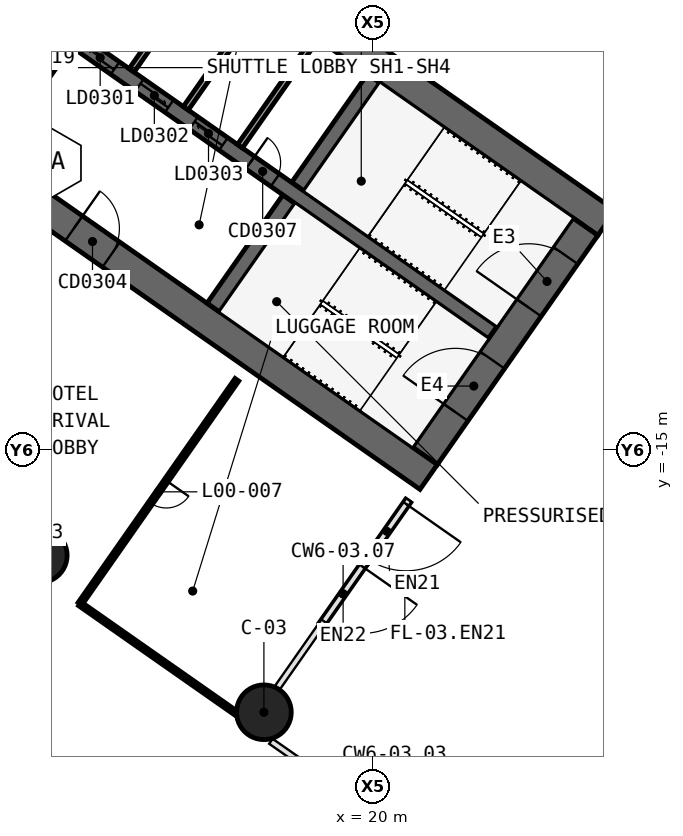
"""IFC4 building model, lengths in metres.
Left out: names, types, materials, properties, quantities, classifications, styles, units other than length and angle.
Written with IfcOpenShell. Run it as: python <this file> out.ifc"""

import sys

from ifc_helpers import new_model, si_unit, direction, frame, frame_2d, origin, origin_2d, place, context, subcontext, project, spatial, polyline, rectangle, circle, outline, extrude, element, fill, save


model = new_model("IFC4")
c1 = context("Model", 3, precision=1e-05, world=origin(), true_north=direction((0.0, 1.0)))
c2 = subcontext(c1, "Body", "Model", "MODEL_VIEW")
j1 = project(units=[si_unit("LENGTHUNIT", "METRE"), si_unit("PLANEANGLEUNIT", "RADIAN")], contexts=[c1])
p1 = place(None, origin())
s1 = spatial("IfcSite", under=j1, at=p1, CompositionType="ELEMENT")
p2 = place(p1, origin())
s2 = spatial("IfcBuilding", under=s1, at=p2, CompositionType="ELEMENT")
p3 = place(p2, origin())
s3 = spatial("IfcBuildingStorey", under=s2, at=p3, CompositionType="ELEMENT", Elevation=0.0)
p4 = place(p3, frame((-0.037, 11.867, 0.0), z_axis=(0.0, 0.0, 1.0), x_axis=(0.819155306259, -0.573571777746, 0.0)))
e1 = element("IfcWall", 1, at=p4, inside=s3, PredefinedType="SHEAR", context=c2, shape_type="SweptSolid", body=[
    extrude(outline(polyline([(33.837, 0.5), (0.0, 0.5), (0.7, -0.5), (33.837, -0.5), (33.837, 0.5)])), origin(), (0.0, 0.0, 1.0), 9.0),
])
p5 = place(p4, frame((4.287, 0.0, 0.0)))
e2 = element("IfcOpeningElement", 2, at=p5, cuts=e1, PredefinedType="OPENING", context=c2, shape_type="SweptSolid", body=[
    extrude(rectangle(XDim=1.1, YDim=2.1, at=frame_2d((0.55, 1.05))), frame((0.0, 0.51, 0.0), z_axis=(0.0, -1.0, 0.0), x_axis=(1.0, 0.0, 0.0)), (0.0, 0.0, 1.0), 1.02),
])
p6 = place(p3, frame((-0.037, -0.585, 0.0), z_axis=(0.0, 0.0, 1.0), x_axis=(0.819157152511, -0.573569140985, 0.0)))
e3 = element("IfcWall", 3, at=p6, inside=s3, PredefinedType="SHEAR", context=c2, shape_type="SweptSolid", body=[
    extrude(outline(polyline([(26.695, 0.5), (0.0, 0.5), (0.7, -0.5), (26.695, -0.5), (26.695, 0.5)])), origin(), (0.0, 0.0, 1.0), 9.0),
])
p7 = place(p6, frame((2.995, 0.0, 0.0)))
e4 = element("IfcOpeningElement", 4, at=p7, cuts=e3, PredefinedType="OPENING", context=c2, shape_type="SweptSolid", body=[
    extrude(rectangle(XDim=2.4, YDim=2.1, at=frame_2d((1.2, 1.05))), frame((0.0, 0.51, 0.0), z_axis=(0.0, -1.0, 0.0), x_axis=(1.0, 0.0, 0.0)), (0.0, 0.0, 1.0), 1.02),
])
p8 = place(p6, frame((12.445, 0.0, 0.0)))
e5 = element("IfcOpeningElement", 5, at=p8, cuts=e3, PredefinedType="OPENING", context=c2, shape_type="SweptSolid", body=[
    extrude(rectangle(XDim=1.5, YDim=2.1, at=frame_2d((0.75, 1.05))), frame((0.0, 0.51, 0.0), z_axis=(0.0, -1.0, 0.0), x_axis=(1.0, 0.0, 0.0)), (0.0, 0.0, 1.0), 1.02),
])
p9 = place(p3, frame((21.708, -15.2, 0.0), z_axis=(0.0, 0.0, 1.0), x_axis=(0.573576324356, 0.819152122709, 0.0)))
e6 = element("IfcWall", 6, at=p9, inside=s3, PredefinedType="SHEAR", context=c2, shape_type="SweptSolid", body=[
    extrude(outline(polyline([(9.2, 0.5), (0.0, 0.5), (0.0, -0.5), (9.2, -0.5), (9.2, 0.5)])), origin(), (0.0, 0.0, 1.0), 9.0),
])
p10 = place(p9, frame((5.95, 0.0, 0.0)))
e7 = element("IfcOpeningElement", 7, at=p10, cuts=e6, PredefinedType="OPENING", context=c2, shape_type="SweptSolid", body=[
    extrude(rectangle(XDim=2.1, YDim=2.1, at=frame_2d((1.05, 1.05))), frame((0.0, 0.51, 0.0), z_axis=(0.0, -1.0, 0.0), x_axis=(1.0, 0.0, 0.0)), (0.0, 0.0, 1.0), 1.02),
])
p11 = place(p9, frame((1.75, 0.0, 0.0)))
e8 = element("IfcOpeningElement", 8, at=p11, cuts=e6, PredefinedType="OPENING", context=c2, shape_type="SweptSolid", body=[
    extrude(rectangle(XDim=2.1, YDim=2.1, at=frame_2d((1.05, 1.05))), frame((0.0, 0.51, 0.0), z_axis=(0.0, -1.0, 0.0), x_axis=(1.0, 0.0, 0.0)), (0.0, 0.0, 1.0), 1.02),
])
p12 = place(p3, frame((7.372, -5.162, 0.0), z_axis=(0.0, 0.0, 1.0), x_axis=(0.573594173421, 0.819139624372, 0.0)))
e9 = element("IfcWall", 9, at=p12, inside=s3, PredefinedType="SHEAR", context=c2, shape_type="SweptSolid", body=[
    extrude(outline(polyline([(0.0, 0.25), (0.0, -0.25), (4.35, -0.25), (4.35, 0.25), (0.0, 0.25)])), origin(), (0.0, 0.0, 1.0), 9.0),
])
p13 = place(p3, frame((14.745, -10.324, 0.0), z_axis=(0.0, 0.0, 1.0), x_axis=(0.57356780395, 0.819158088694, 0.0)))
e10 = element("IfcWall", 10, at=p13, inside=s3, PredefinedType="SHEAR", context=c2, shape_type="SweptSolid", body=[
    extrude(outline(polyline([(0.0, 0.25), (0.0, -0.25), (4.35, -0.25), (4.35, 0.25), (0.0, 0.25)])), origin(), (0.0, 0.0, 1.0), 9.0),
])
p14 = place(p3, frame((17.527, -6.352, 0.0), z_axis=(0.0, 0.0, 1.0), x_axis=(0.573530143085, 0.819184457233, 0.0)))
e11 = element("IfcWall", 11, at=p14, inside=s3, PredefinedType="SHEAR", context=c2, shape_type="SweptSolid", body=[
    extrude(outline(polyline([(4.35, -0.25), (4.35, 0.25), (0.0, 0.25), (0.0, -0.25), (4.35, -0.25)])), origin(), (0.0, 0.0, 1.0), 9.0),
])
p15 = place(p3, frame((2.638, 3.768, 0.0), z_axis=(0.0, 0.0, 1.0), x_axis=(0.819148977158, -0.573580816643, 0.0)))
e12 = element("IfcWall", 12, at=p15, inside=s3, PredefinedType="SHEAR", context=c2, shape_type="SweptSolid", body=[
    extrude(outline(polyline([(0.0, 0.25), (0.0, -0.25), (26.0, -0.25), (26.0, 0.25), (0.0, 0.25)])), origin(), (0.0, 0.0, 1.0), 9.0),
])
p16 = place(p15, frame((1.119, 0.0, 0.0)))
e13 = element("IfcOpeningElement", 13, at=p16, cuts=e12, PredefinedType="OPENING", context=c2, shape_type="SweptSolid", body=[
    extrude(rectangle(XDim=1.2, YDim=2.1, at=frame_2d((0.6, 1.05))), frame((0.0, 0.26, 0.0), z_axis=(0.0, -1.0, 0.0), x_axis=(1.0, 0.0, 0.0)), (0.0, 0.0, 1.0), 0.52),
])
p17 = place(p15, frame((3.156, 0.0, 0.0)))
e14 = element("IfcOpeningElement", 14, at=p17, cuts=e12, PredefinedType="OPENING", context=c2, shape_type="SweptSolid", body=[
    extrude(rectangle(XDim=1.2, YDim=2.1, at=frame_2d((0.6, 1.05))), frame((0.0, 0.26, 0.0), z_axis=(0.0, -1.0, 0.0), x_axis=(1.0, 0.0, 0.0)), (0.0, 0.0, 1.0), 0.52),
])
p18 = place(p15, frame((5.194, 0.0, 0.0)))
e15 = element("IfcOpeningElement", 15, at=p18, cuts=e12, PredefinedType="OPENING", context=c2, shape_type="SweptSolid", body=[
    extrude(rectangle(XDim=1.2, YDim=2.1, at=frame_2d((0.6, 1.05))), frame((0.0, 0.26, 0.0), z_axis=(0.0, -1.0, 0.0), x_axis=(1.0, 0.0, 0.0)), (0.0, 0.0, 1.0), 0.52),
])
p19 = place(p15, frame((7.231, 0.0, 0.0)))
e16 = element("IfcOpeningElement", 16, at=p19, cuts=e12, PredefinedType="OPENING", context=c2, shape_type="SweptSolid", body=[
    extrude(rectangle(XDim=1.2, YDim=2.1, at=frame_2d((0.6, 1.05))), frame((0.0, 0.26, 0.0), z_axis=(0.0, -1.0, 0.0), x_axis=(1.0, 0.0, 0.0)), (0.0, 0.0, 1.0), 0.52),
])
p20 = place(p15, frame((9.637, 0.0, 0.0)))
e17 = element("IfcOpeningElement", 17, at=p20, cuts=e12, PredefinedType="OPENING", context=c2, shape_type="SweptSolid", body=[
    extrude(rectangle(XDim=1.2, YDim=2.1, at=frame_2d((0.6, 1.05))), frame((0.0, 0.26, 0.0), z_axis=(0.0, -1.0, 0.0), x_axis=(1.0, 0.0, 0.0)), (0.0, 0.0, 1.0), 0.52),
])
p21 = place(p15, frame((11.812, 0.0, 0.0)))
e18 = element("IfcOpeningElement", 18, at=p21, cuts=e12, PredefinedType="OPENING", context=c2, shape_type="SweptSolid", body=[
    extrude(rectangle(XDim=1.2, YDim=2.1, at=frame_2d((0.6, 1.05))), frame((0.0, 0.26, 0.0), z_axis=(0.0, -1.0, 0.0), x_axis=(1.0, 0.0, 0.0)), (0.0, 0.0, 1.0), 0.52),
])
p22 = place(p15, frame((13.988, 0.0, 0.0)))
e19 = element("IfcOpeningElement", 19, at=p22, cuts=e12, PredefinedType="OPENING", context=c2, shape_type="SweptSolid", body=[
    extrude(rectangle(XDim=1.2, YDim=2.1, at=frame_2d((0.6, 1.05))), frame((0.0, 0.26, 0.0), z_axis=(0.0, -1.0, 0.0), x_axis=(1.0, 0.0, 0.0)), (0.0, 0.0, 1.0), 0.52),
])
p23 = place(p15, frame((16.262, 0.0, 0.0)))
e20 = element("IfcOpeningElement", 20, at=p23, cuts=e12, PredefinedType="OPENING", context=c2, shape_type="SweptSolid", body=[
    extrude(rectangle(XDim=1.0, YDim=2.1, at=frame_2d((0.5, 1.05))), frame((0.0, 0.26, 0.0), z_axis=(0.0, -1.0, 0.0), x_axis=(1.0, 0.0, 0.0)), (0.0, 0.0, 1.0), 0.52),
])
for number, where, z_axis, x_axis in (
    (21, (9.038, -18.475, 0.0), (0.0, 0.0, 1.0), (0.819, -0.574, 0.0)),
    (22, (16.41, -23.637, 0.0), (0.0, 0.0, 1.0), (0.819, -0.574, 0.0)),
):
    element("IfcColumn", number, at=place(p3, frame(where, z_axis=z_axis, x_axis=x_axis)), inside=s3, PredefinedType="COLUMN", context=c2, shape_type="SweptSolid", body=[
        extrude(circle(Radius=0.9, at=origin_2d()), origin(), (0.0, 0.0, 1.0), 9.0),
    ])
p24 = place(p3, frame((12.059, -2.523, 0.0), z_axis=(0.0, 0.0, 1.0), x_axis=(0.573594173421, 0.819139624372, 0.0)))
e23 = element("IfcWall", 23, at=p24, inside=s3, PredefinedType="SOLIDWALL", context=c2, shape_type="SweptSolid", body=[
    extrude(rectangle(XDim=4.35, YDim=0.2, at=frame_2d((2.175, 0.0))), origin(), (0.0, 0.0, 1.0), 9.0),
])
p25 = place(p3, frame((13.84, -3.771, 0.0), z_axis=(0.0, 0.0, 1.0), x_axis=(0.57356780395, 0.819158088694, 0.0)))
e24 = element("IfcWall", 24, at=p25, inside=s3, PredefinedType="SOLIDWALL", context=c2, shape_type="SweptSolid", body=[
    extrude(rectangle(XDim=4.35, YDim=0.2, at=frame_2d((2.175, 0.0))), origin(), (0.0, 0.0, 1.0), 9.0),
])
p26 = place(p3, frame((15.622, -5.018, 0.0), z_axis=(0.0, 0.0, 1.0), x_axis=(0.573594173421, 0.819139624372, 0.0)))
e25 = element("IfcWall", 25, at=p26, inside=s3, PredefinedType="SOLIDWALL", context=c2, shape_type="SweptSolid", body=[
    extrude(rectangle(XDim=4.35, YDim=0.2, at=frame_2d((2.175, 0.0))), origin(), (0.0, 0.0, 1.0), 9.0),
])
p27 = place(p3, frame((21.158, -16.683, 0.0), z_axis=(0.0, 0.0, 1.0), x_axis=(-0.573616137927, -0.819124243512, 0.0)))
e26 = element("IfcWall", 26, at=p27, inside=s3, PredefinedType="SOLIDWALL", context=c2, shape_type="SweptSolid", body=[
    extrude(rectangle(XDim=2.45, YDim=0.2, at=frame_2d((1.225, 0.0))), origin(), (0.0, 0.0, 1.0), 2.7),
])
p28 = place(p27, frame((0.125, 0.0, 0.0)))
e27 = element("IfcOpeningElement", 27, at=p28, cuts=e26, PredefinedType="OPENING", context=c2, shape_type="SweptSolid", body=[
    extrude(rectangle(XDim=2.2, YDim=2.4, at=frame_2d((1.1, 1.2))), frame((0.0, 0.11, 0.0), z_axis=(0.0, -1.0, 0.0), x_axis=(1.0, 0.0, 0.0)), (0.0, 0.0, 1.0), 0.22),
])
p29 = place(p3, frame((19.718, -18.739, 0.0), z_axis=(0.0, 0.0, 1.0), x_axis=(-0.573549278612, -0.819171059672, 0.0)))
e28 = element("IfcWall", 28, at=p29, inside=s3, PredefinedType="SOLIDWALL", context=c2, shape_type="SweptSolid", body=[
    extrude(rectangle(XDim=2.45, YDim=0.2, at=frame_2d((1.225, 0.0))), origin(), (0.0, 0.0, 1.0), 2.7),
])
p30 = place(p29, frame((0.125, 0.0, 0.0)))
e29 = element("IfcOpeningElement", 29, at=p30, cuts=e28, PredefinedType="OPENING", context=c2, shape_type="SweptSolid", body=[
    extrude(rectangle(XDim=2.2, YDim=2.4, at=frame_2d((1.1, 1.2))), frame((0.0, 0.11, 0.0), z_axis=(0.0, -1.0, 0.0), x_axis=(1.0, 0.0, 0.0)), (0.0, 0.0, 1.0), 0.22),
])
p31 = place(p3, frame((10.359, -20.072, 0.0), z_axis=(0.0, 0.0, 1.0), x_axis=(0.819155033433, -0.573572167388, 0.0)))
e30 = element("IfcWall", 30, at=p31, inside=s3, PredefinedType="PARTITIONING", context=c2, shape_type="SweptSolid", body=[
    extrude(rectangle(XDim=6.266, YDim=0.15, at=frame_2d((3.133, 0.0))), origin(), (0.0, 0.0, 1.0), 8.6),
])
p32 = place(p3, frame((15.522, -12.7, 0.0), z_axis=(0.0, 0.0, 1.0), x_axis=(-0.573591598124, -0.819141427692, 0.0)))
e31 = element("IfcWall", 31, at=p32, inside=s3, PredefinedType="PARTITIONING", context=c2, shape_type="SweptSolid", body=[
    extrude(rectangle(XDim=9.0, YDim=0.15, at=frame_2d((4.5, 0.0))), origin(), (0.0, 0.0, 1.0), 7.38),
])
p33 = place(p32, frame((4.05, 0.0, 0.0)))
e32 = element("IfcOpeningElement", 32, at=p33, cuts=e31, PredefinedType="OPENING", context=c2, shape_type="SweptSolid", body=[
    extrude(rectangle(XDim=0.9, YDim=2.1, at=frame_2d((0.45, 1.05))), frame((0.0, 0.085, 0.0), z_axis=(0.0, -1.0, 0.0), x_axis=(1.0, 0.0, 0.0)), (0.0, 0.0, 1.0), 0.17),
])
p34 = place(p20, origin())
e33 = element("IfcDoor", 33, at=p34, inside=s3, OperationType="SLIDING_TO_LEFT", PredefinedType="DOOR", context=c2, shape_type="SweptSolid", body=[
    extrude(rectangle(XDim=1.2, YDim=2.1, at=frame_2d((0.6, 1.05))), frame((0.0, 0.025, 0.0), z_axis=(0.0, -1.0, 0.0), x_axis=(1.0, 0.0, 0.0)), (0.0, 0.0, 1.0), 0.05),
])
fill(e17, e33)
p35 = place(p21, origin())
e34 = element("IfcDoor", 34, at=p35, inside=s3, OperationType="SLIDING_TO_RIGHT", PredefinedType="DOOR", context=c2, shape_type="SweptSolid", body=[
    extrude(rectangle(XDim=1.2, YDim=2.1, at=frame_2d((0.6, 1.05))), frame((0.0, 0.025, 0.0), z_axis=(0.0, -1.0, 0.0), x_axis=(1.0, 0.0, 0.0)), (0.0, 0.0, 1.0), 0.05),
])
fill(e18, e34)
p36 = place(p22, origin())
e35 = element("IfcDoor", 35, at=p36, inside=s3, OperationType="SLIDING_TO_LEFT", PredefinedType="DOOR", context=c2, shape_type="SweptSolid", body=[
    extrude(rectangle(XDim=1.2, YDim=2.1, at=frame_2d((0.6, 1.05))), frame((0.0, 0.025, 0.0), z_axis=(0.0, -1.0, 0.0), x_axis=(1.0, 0.0, 0.0)), (0.0, 0.0, 1.0), 0.05),
])
fill(e19, e35)
p37 = place(p23, origin())
e36 = element("IfcDoor", 36, at=p37, inside=s3, OperationType="SINGLE_SWING_RIGHT", PredefinedType="DOOR", context=c2, shape_type="SweptSolid", body=[
    extrude(rectangle(XDim=1.0, YDim=2.1, at=frame_2d((0.5, 1.05))), frame((0.0, 0.025, 0.0), z_axis=(0.0, -1.0, 0.0), x_axis=(1.0, 0.0, 0.0)), (0.0, 0.0, 1.0), 0.05),
])
fill(e20, e36)
p38 = place(p8, origin())
e37 = element("IfcDoor", 37, at=p38, inside=s3, OperationType="DOUBLE_DOOR_SINGLE_SWING", PredefinedType="DOOR", context=c2, shape_type="SweptSolid", body=[
    extrude(rectangle(XDim=1.5, YDim=2.1, at=frame_2d((0.75, 1.05))), frame((0.0, 0.025, 0.0), z_axis=(0.0, -1.0, 0.0), x_axis=(1.0, 0.0, 0.0)), (0.0, 0.0, 1.0), 0.05),
])
fill(e5, e37)
p39 = place(p10, origin())
e38 = element("IfcDoor", 38, at=p39, inside=s3, OperationType="DOUBLE_DOOR_SINGLE_SWING", PredefinedType="DOOR", context=c2, shape_type="SweptSolid", body=[
    extrude(rectangle(XDim=2.1, YDim=2.1, at=frame_2d((1.05, 1.05))), frame((0.0, 0.025, 0.0), z_axis=(0.0, -1.0, 0.0), x_axis=(1.0, 0.0, 0.0)), (0.0, 0.0, 1.0), 0.05),
])
fill(e7, e38)
p40 = place(p11, origin())
e39 = element("IfcDoor", 39, at=p40, inside=s3, OperationType="DOUBLE_DOOR_SINGLE_SWING", PredefinedType="DOOR", context=c2, shape_type="SweptSolid", body=[
    extrude(rectangle(XDim=2.1, YDim=2.1, at=frame_2d((1.05, 1.05))), frame((0.0, 0.025, 0.0), z_axis=(0.0, -1.0, 0.0), x_axis=(1.0, 0.0, 0.0)), (0.0, 0.0, 1.0), 0.05),
])
fill(e8, e39)
p41 = place(p28, origin())
e40 = element("IfcDoor", 40, at=p41, inside=s3, OperationType="DOUBLE_DOOR_DOUBLE_SWING", PredefinedType="DOOR", context=c2, shape_type="SweptSolid", body=[
    extrude(rectangle(XDim=2.2, YDim=2.4, at=frame_2d((1.1, 1.2))), frame((0.0, 0.025, 0.0), z_axis=(0.0, -1.0, 0.0), x_axis=(1.0, 0.0, 0.0)), (0.0, 0.0, 1.0), 0.05),
])
fill(e27, e40)
p42 = place(p30, origin())
e41 = element("IfcDoor", 41, at=p42, inside=s3, OperationType="DOUBLE_DOOR_DOUBLE_SWING", PredefinedType="DOOR", context=c2, shape_type="SweptSolid", body=[
    extrude(rectangle(XDim=2.2, YDim=2.4, at=frame_2d((1.1, 1.2))), frame((0.0, 0.025, 0.0), z_axis=(0.0, -1.0, 0.0), x_axis=(1.0, 0.0, 0.0)), (0.0, 0.0, 1.0), 0.05),
])
fill(e29, e41)
p43 = place(p33, origin())
e42 = element("IfcDoor", 42, at=p43, inside=s3, OperationType="SINGLE_SWING_RIGHT", PredefinedType="DOOR", context=c2, shape_type="SweptSolid", body=[
    extrude(rectangle(XDim=0.9, YDim=2.1, at=frame_2d((0.45, 1.05))), frame((0.0, 0.025, 0.0), z_axis=(0.0, -1.0, 0.0), x_axis=(1.0, 0.0, 0.0)), (0.0, 0.0, 1.0), 0.05),
])
fill(e32, e42)
save(model, sys.argv[1])
